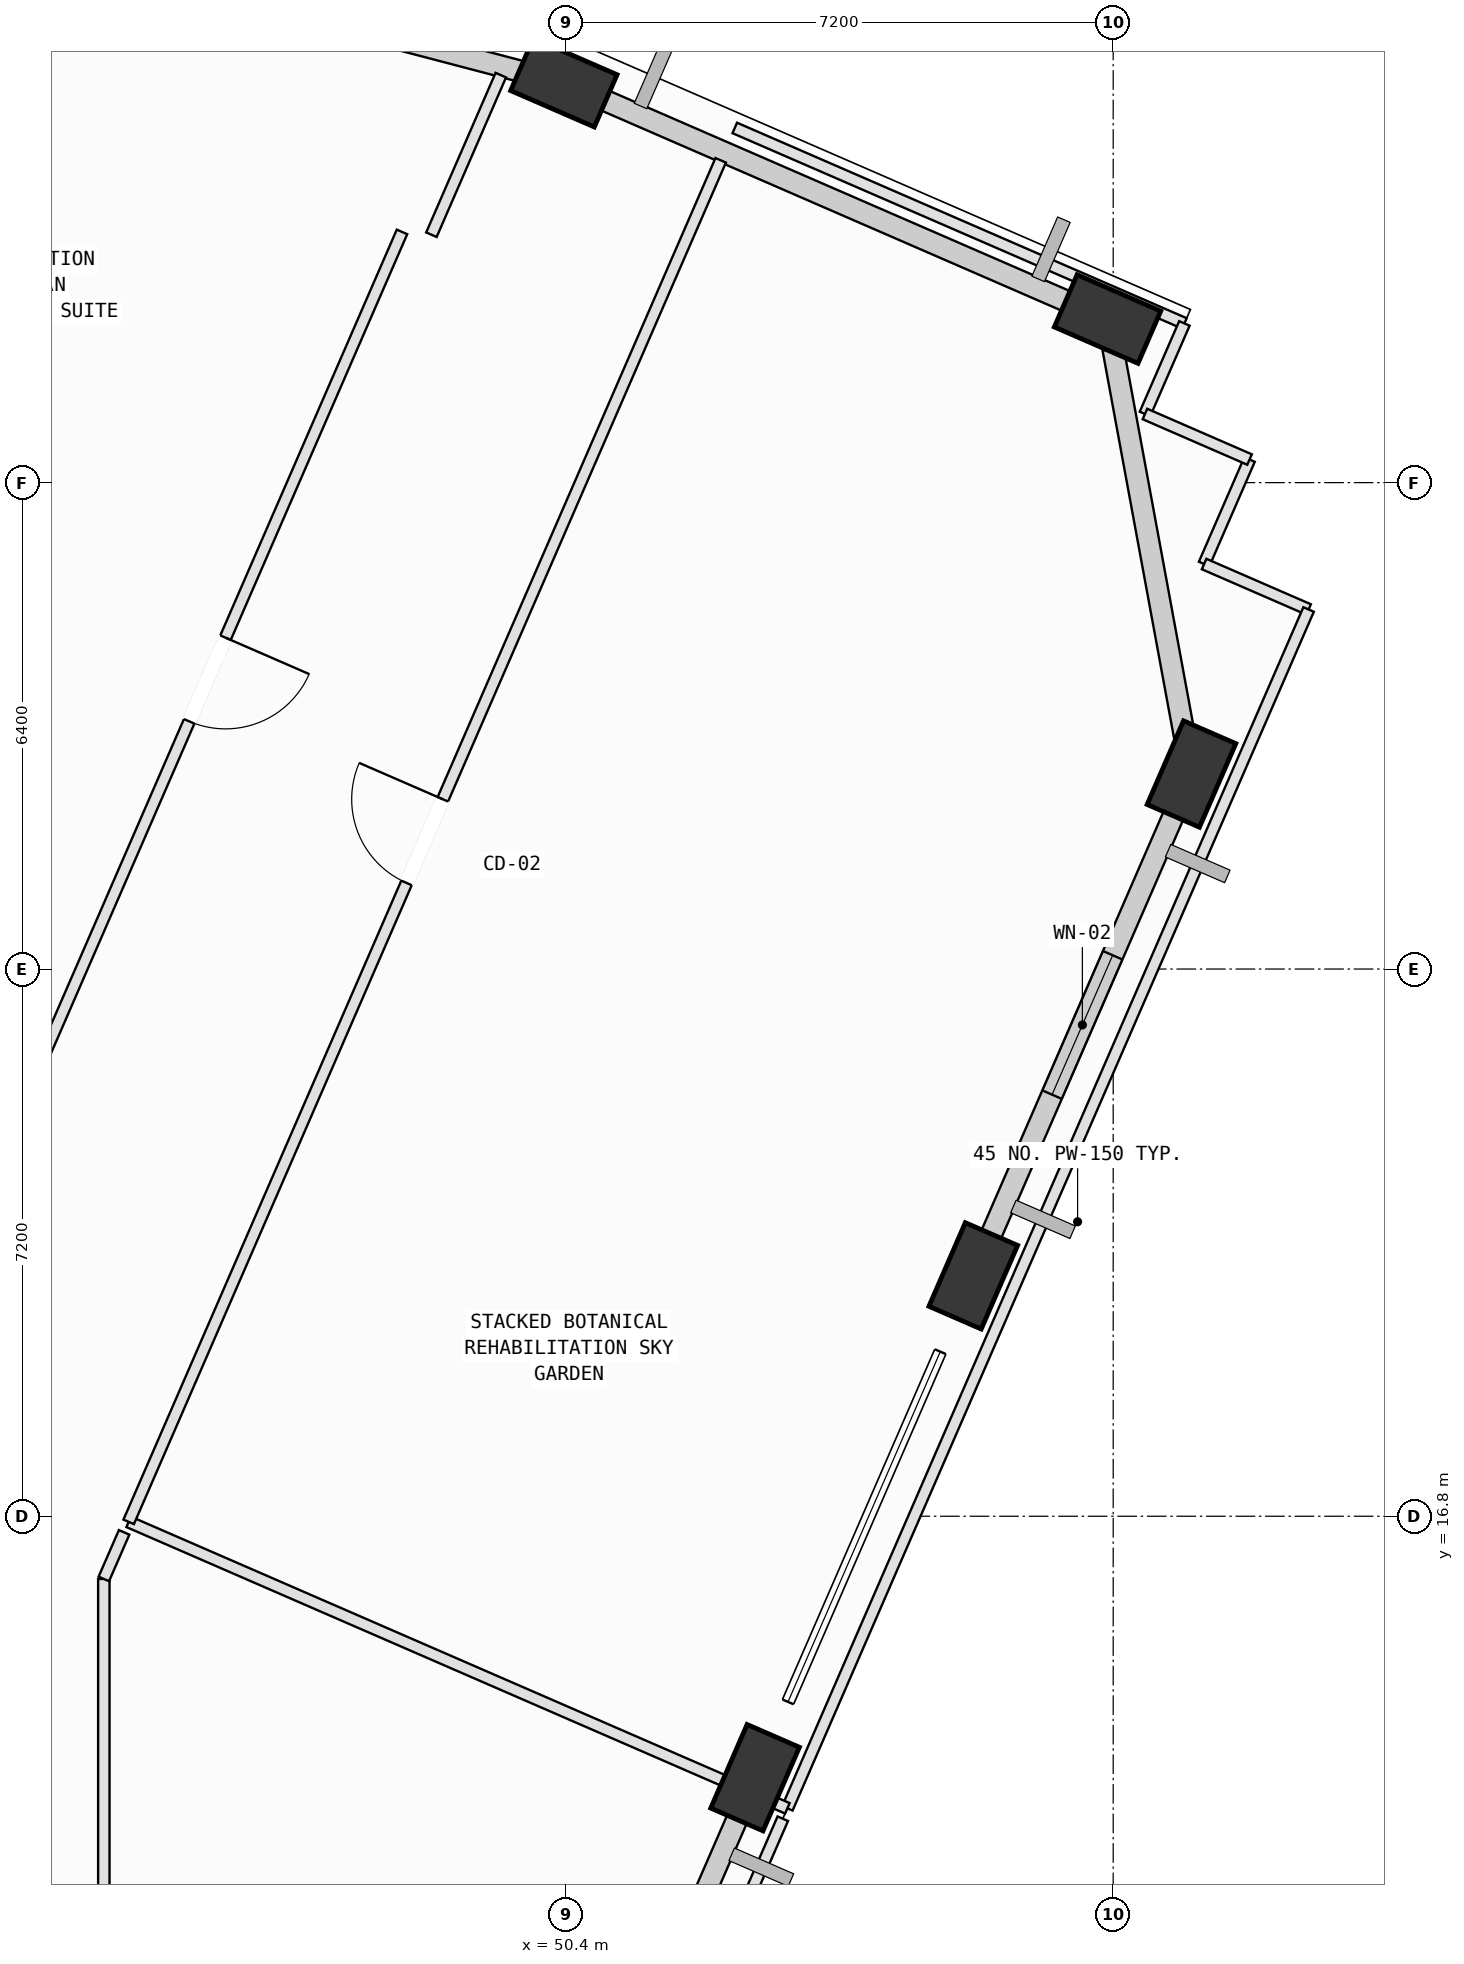
"""IFC4 building model, lengths in metres.
Left out: names, types, materials, properties, quantities, classifications, styles, units other than length and angle.
Written with IfcOpenShell. Run it as: python <this file> out.ifc"""

import sys

from ifc_helpers import new_model, si_unit, direction, frame, frame_2d, origin, origin_2d, place, context, subcontext, project, spatial, rectangle, extrude, element, fill, save


model = new_model("IFC4")
c1 = context("Model", 3, precision=1e-05, world=origin(), true_north=direction((0.0, 1.0)))
c2 = subcontext(c1, "Body", "Model", "MODEL_VIEW")
j1 = project(units=[si_unit("LENGTHUNIT", "METRE"), si_unit("PLANEANGLEUNIT", "RADIAN")], contexts=[c1])
p1 = place(None, origin())
s1 = spatial("IfcSite", under=j1, at=p1, CompositionType="ELEMENT")
p2 = place(p1, origin())
s2 = spatial("IfcBuilding", under=s1, at=p2, CompositionType="ELEMENT")
p3 = place(p2, frame((0.0, 0.0, 328.6)))
s3 = spatial("IfcBuildingStorey", under=s2, at=p3, CompositionType="ELEMENT", Elevation=328.6)
for number, where, z_axis, x_axis in (
    (1, (52.888, 13.36, 0.002), (0.0, 0.0, 1.0), (0.399, 0.917, 0.0)),
    (2, (55.759, 19.963, 0.002), (0.0, 0.0, 1.0), (0.399, 0.917, 0.0)),
    (3, (58.63, 26.566, 0.002), (0.0, 0.0, 1.0), (0.399, 0.917, 0.0)),
    (4, (57.526, 32.553, 0.002), (0.0, 0.0, 1.0), (-0.917, 0.399, 0.0)),
    (5, (50.373, 35.663, 0.002), (0.0, 0.0, 1.0), (-0.917, 0.399, 0.0)),
):
    element("IfcColumn", number, at=place(p3, frame(where, z_axis=z_axis, x_axis=x_axis)), inside=s3, PredefinedType="COLUMN", context=c2, shape_type="SweptSolid", body=[
        extrude(rectangle(XDim=1.2, YDim=0.75, at=origin_2d()), origin(), (0.0, 0.0, 1.0), 4.796),
    ])
p4 = place(p3, frame((52.729, 12.996, 0.0), z_axis=(0.0, 0.0, 1.0), x_axis=(-0.398744230651, -0.917062178112, 0.0)))
e6 = element("IfcWall", 6, at=p4, inside=s3, PredefinedType="SOLIDWALL", context=c2, shape_type="SweptSolid", body=[
    extrude(rectangle(XDim=6.405, YDim=0.28, at=frame_2d((3.203, 0.0))), origin(), (0.0, 0.0, 1.0), 4.065),
])
p5 = place(p4, frame((2.403, 0.0, 0.75)))
e7 = element("IfcOpeningElement", 7, at=p5, cuts=e6, PredefinedType="OPENING", context=c2, shape_type="SweptSolid", body=[
    extrude(rectangle(XDim=1.6, YDim=1.95, at=frame_2d((0.8, 0.975))), frame((0.0, 0.15, 0.0), z_axis=(0.0, -1.0, 0.0), x_axis=(1.0, 0.0, 0.0)), (0.0, 0.0, 1.0), 0.3),
])
p6 = place(p3, frame((58.472, 26.201, 0.0), z_axis=(0.0, 0.0, 1.0), x_axis=(-0.398776286617, -0.917048239316, 0.0)))
e8 = element("IfcWall", 8, at=p6, inside=s3, PredefinedType="SOLIDWALL", context=c2, shape_type="SweptSolid", body=[
    extrude(rectangle(XDim=6.405, YDim=0.28, at=frame_2d((3.203, 0.0))), origin(), (0.0, 0.0, 1.0), 4.065),
])
p7 = place(p6, frame((2.202, 0.0, 0.75)))
e9 = element("IfcOpeningElement", 9, at=p7, cuts=e8, PredefinedType="OPENING", context=c2, shape_type="SweptSolid", body=[
    extrude(rectangle(XDim=2.0, YDim=1.95, at=frame_2d((1.0, 0.975))), frame((0.0, 0.15, 0.0), z_axis=(0.0, -1.0, 0.0), x_axis=(1.0, 0.0, 0.0)), (0.0, 0.0, 1.0), 0.3),
])
p8 = place(p3, frame((57.598, 32.162, 0.0), z_axis=(0.0, 0.0, 1.0), x_axis=(0.181421889976, -0.983405357845, 0.0)))
e10 = element("IfcWall", 10, at=p8, inside=s3, PredefinedType="SOLIDWALL", context=c2, shape_type="SweptSolid", body=[
    extrude(rectangle(XDim=5.293, YDim=0.28, at=frame_2d((2.646, 0.0))), origin(), (0.0, 0.0, 1.0), 4.065),
])
p9 = place(p3, frame((50.737, 35.504, 0.0), z_axis=(0.0, 0.0, 1.0), x_axis=(0.917057311373, -0.398755423359, 0.0)))
e11 = element("IfcWall", 11, at=p9, inside=s3, PredefinedType="SOLIDWALL", context=c2, shape_type="SweptSolid", body=[
    extrude(rectangle(XDim=7.005, YDim=0.28, at=frame_2d((3.502, 0.0))), origin(), (0.0, 0.0, 1.0), 4.065),
])
p10 = place(p3, frame((41.264, 38.054, 0.0), z_axis=(0.0, 0.0, 1.0), x_axis=(0.967228971308, -0.253905724755, 0.0)))
e12 = element("IfcWall", 12, at=p10, inside=s3, PredefinedType="SOLIDWALL", context=c2, shape_type="SweptSolid", body=[
    extrude(rectangle(XDim=9.02, YDim=0.28, at=frame_2d((4.51, 0.0))), origin(), (0.0, 0.0, 1.0), 4.065),
])
for number, where, z_axis, x_axis in (
    (13, (59.394, 30.704, 0.0), (0.0, 0.0, 1.0), (-0.399, -0.917, 0.0)),
    (14, (58.796, 29.329, 0.0), (0.0, 0.0, 1.0), (0.917, -0.399, 0.0)),
):
    element("IfcWall", number, at=place(p3, frame(where, z_axis=z_axis, x_axis=x_axis)), inside=s3, PredefinedType="PARTITIONING", context=c2, shape_type="SweptSolid", body=[
        extrude(rectangle(XDim=1.5, YDim=0.15, at=frame_2d((0.75, 0.0))), origin(), (0.0, 0.0, 1.0), 4.58),
    ])
p11 = place(p3, frame((60.171, 28.731, 0.0), z_axis=(0.0, 0.0, 1.0), x_axis=(-0.39871054079, -0.917076825933, 0.0)))
e15 = element("IfcWall", 15, at=p11, inside=s3, PredefinedType="PARTITIONING", context=c2, shape_type="SweptSolid", body=[
    extrude(rectangle(XDim=17.2, YDim=0.15, at=frame_2d((8.6, 0.0))), origin(), (0.0, 0.0, 1.0), 4.58),
])
p12 = place(p3, frame((53.313, 12.957, 0.0), z_axis=(0.0, 0.0, 1.0), x_axis=(-0.917023227373, 0.398833800546, 0.0)))
e16 = element("IfcWall", 16, at=p12, inside=s3, PredefinedType="PARTITIONING", context=c2, shape_type="SweptSolid", body=[
    extrude(rectangle(XDim=9.45, YDim=0.15, at=frame_2d((4.725, 0.0))), origin(), (0.0, 0.0, 1.0), 4.58),
])
p13 = place(p3, frame((44.647, 16.726, 0.0), z_axis=(0.0, 0.0, 1.0), x_axis=(0.398722455525, 0.917071645762, 0.0)))
e17 = element("IfcWall", 17, at=p13, inside=s3, PredefinedType="PARTITIONING", context=c2, shape_type="SweptSolid", body=[
    extrude(rectangle(XDim=19.535, YDim=0.15, at=frame_2d((9.768, 0.0))), origin(), (0.0, 0.0, 1.0), 4.215),
])
p14 = place(p13, frame((9.167, 0.0, 0.0)))
e18 = element("IfcOpeningElement", 18, at=p14, cuts=e17, PredefinedType="OPENING", context=c2, shape_type="SweptSolid", body=[
    extrude(rectangle(XDim=1.2, YDim=2.15, at=frame_2d((0.6, 1.075))), frame((0.0, 0.085, 0.0), z_axis=(0.0, -1.0, 0.0), x_axis=(1.0, 0.0, 0.0)), (0.0, 0.0, 1.0), 0.17),
])
p15 = place(p3, frame((52.621, 35.067, 0.0), z_axis=(0.0, 0.0, 1.0), x_axis=(0.917092918999, -0.398673522975, 0.0)))
e19 = element("IfcWall", 19, at=p15, inside=s3, PredefinedType="PARTITIONING", context=c2, shape_type="SweptSolid", body=[
    extrude(rectangle(XDim=6.451, YDim=0.15, at=frame_2d((3.226, 0.0))), origin(), (0.0, 0.0, 1.0), 4.065),
])
p16 = place(p3, frame((58.537, 32.495, 0.0), z_axis=(0.0, 0.0, 1.0), x_axis=(-0.3991929402, -0.916866945906, 0.0)))
e20 = element("IfcWall", 20, at=p16, inside=s3, PredefinedType="PARTITIONING", context=c2, shape_type="SweptSolid", body=[
    extrude(rectangle(XDim=1.3, YDim=0.15, at=frame_2d((0.65, 0.0))), origin(), (0.0, 0.0, 1.0), 4.58),
])
p17 = place(p3, frame((58.018, 31.303, 0.0), z_axis=(0.0, 0.0, 1.0), x_axis=(0.91691738696, -0.399077067107, 0.0)))
e21 = element("IfcWall", 21, at=p17, inside=s3, PredefinedType="PARTITIONING", context=c2, shape_type="SweptSolid", body=[
    extrude(rectangle(XDim=1.501, YDim=0.15, at=frame_2d((0.75, 0.0))), origin(), (0.0, 0.0, 1.0), 4.58),
])
p18 = place(p3, frame((44.32, 7.8, 0.0), z_axis=(0.0, 0.0, 1.0), x_axis=(0.0, 1.0, 0.0)))
e22 = element("IfcWall", 22, at=p18, inside=s3, PredefinedType="PARTITIONING", context=c2, shape_type="SweptSolid", body=[
    extrude(rectangle(XDim=8.175, YDim=0.15, at=frame_2d((4.087, 0.0))), origin(), (0.0, 0.0, 1.0), 4.215),
])
p19 = place(p3, frame((44.32, 15.975, 0.0), z_axis=(0.0, 0.0, 1.0), x_axis=(0.399246957759, 0.916843425411, 0.0)))
e23 = element("IfcWall", 23, at=p19, inside=s3, PredefinedType="PARTITIONING", context=c2, shape_type="SweptSolid", body=[
    extrude(rectangle(XDim=0.668, YDim=0.15, at=frame_2d((0.334, 0.0))), origin(), (0.0, 0.0, 1.0), 4.58),
])
p20 = place(p3, frame((53.253, 12.82, 0.0), z_axis=(0.0, 0.0, 1.0), x_axis=(-0.39875225923, -0.917058687194, 0.0)))
e24 = element("IfcWall", 24, at=p20, inside=s3, PredefinedType="PARTITIONING", context=c2, shape_type="SweptSolid", body=[
    extrude(rectangle(XDim=21.85, YDim=0.15, at=frame_2d((10.925, 0.0))), origin(), (0.0, 0.0, 1.0), 4.58),
])
p21 = place(p3, frame((48.243, 33.699, 0.0), z_axis=(0.0, 0.0, 1.0), x_axis=(-0.398758777505, -0.917055852913, 0.0)))
e25 = element("IfcWall", 25, at=p21, inside=s3, PredefinedType="PARTITIONING", context=c2, shape_type="SweptSolid", body=[
    extrude(rectangle(XDim=12.844, YDim=0.15, at=frame_2d((6.422, 0.0))), origin(), (0.0, 0.0, 1.0), 3.565),
])
p22 = place(p21, frame((5.822, 0.0, 0.0)))
e26 = element("IfcOpeningElement", 26, at=p22, cuts=e25, PredefinedType="OPENING", context=c2, shape_type="SweptSolid", body=[
    extrude(rectangle(XDim=1.2, YDim=2.15, at=frame_2d((0.6, 1.075))), frame((0.0, 0.085, 0.0), z_axis=(0.0, -1.0, 0.0), x_axis=(1.0, 0.0, 0.0)), (0.0, 0.0, 1.0), 0.17),
])
p23 = place(p3, frame((49.543, 35.762, 0.0), z_axis=(0.0, 0.0, 1.0), x_axis=(-0.398765098315, -0.917053104441, 0.0)))
e27 = element("IfcWall", 27, at=p23, inside=s3, PredefinedType="PARTITIONING", context=c2, shape_type="SweptSolid", body=[
    extrude(rectangle(XDim=2.29, YDim=0.15, at=frame_2d((1.145, 0.0))), origin(), (0.0, 0.0, 1.0), 3.565),
])
p24 = place(p7, origin())
e28 = element("IfcWindow", 28, at=p24, inside=s3, PartitioningType="SINGLE_PANEL", PredefinedType="WINDOW", context=c2, shape_type="SweptSolid", body=[
    extrude(rectangle(XDim=2.0, YDim=1.95, at=frame_2d((1.0, 0.975))), frame((0.0, 0.03, 0.0), z_axis=(0.0, -1.0, 0.0), x_axis=(1.0, 0.0, 0.0)), (0.0, 0.0, 1.0), 0.06),
])
fill(e9, e28)
p25 = place(p14, origin())
e29 = element("IfcDoor", 29, at=p25, inside=s3, OperationType="SINGLE_SWING_RIGHT", PredefinedType="DOOR", context=c2, shape_type="SweptSolid", body=[
    extrude(rectangle(XDim=1.2, YDim=2.15, at=frame_2d((0.6, 1.075))), frame((0.0, 0.025, 0.0), z_axis=(0.0, -1.0, 0.0), x_axis=(1.0, 0.0, 0.0)), (0.0, 0.0, 1.0), 0.05),
])
fill(e18, e29)
p26 = place(p22, origin())
e30 = element("IfcDoor", 30, at=p26, inside=s3, OperationType="SINGLE_SWING_LEFT", PredefinedType="DOOR", context=c2, shape_type="SweptSolid", body=[
    extrude(rectangle(XDim=1.2, YDim=2.15, at=frame_2d((0.6, 1.075))), frame((0.0, 0.025, 0.0), z_axis=(0.0, -1.0, 0.0), x_axis=(1.0, 0.0, 0.0)), (0.0, 0.0, 1.0), 0.05),
])
fill(e26, e30)
save(model, sys.argv[1])
